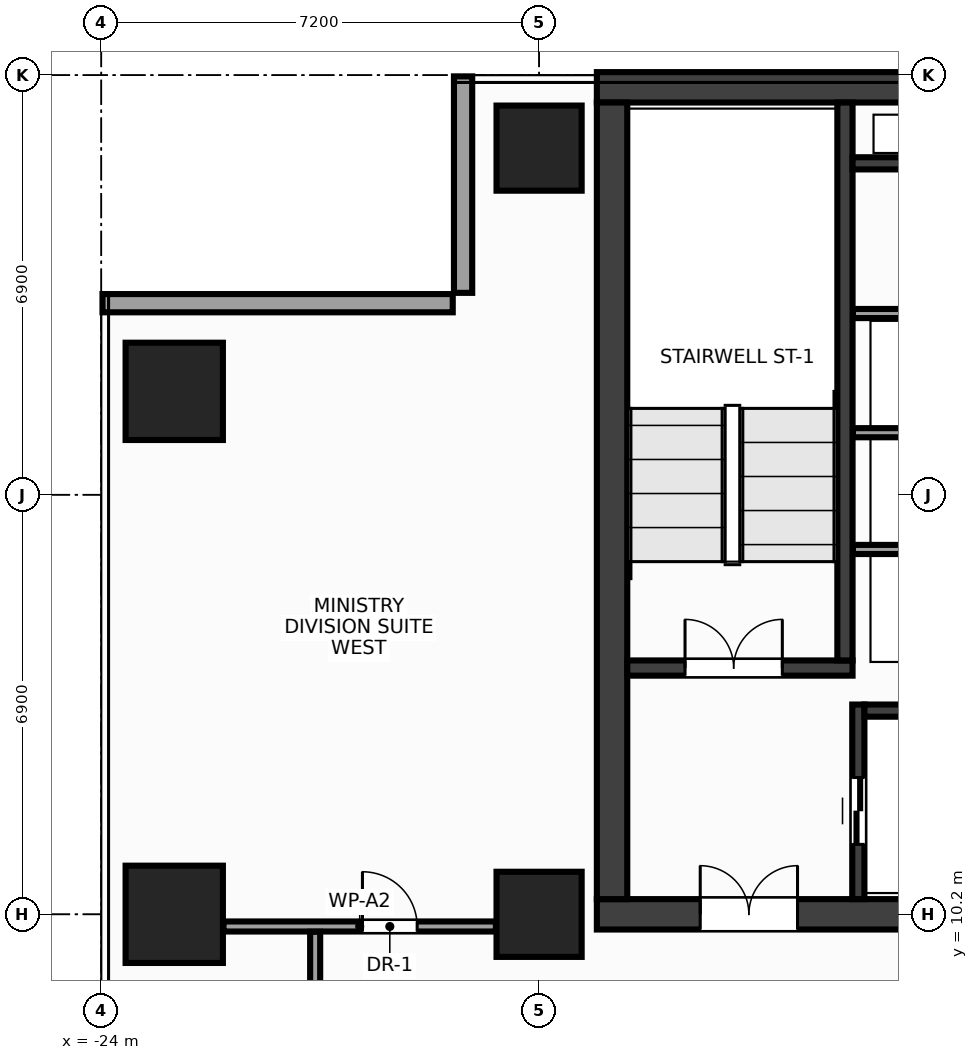
"""IFC4 building model, lengths in metres.
Left out: names, types, materials, properties, quantities, classifications, styles, units other than length and angle.
Written with IfcOpenShell. Run it as: python <this file> out.ifc"""

import sys

from ifc_helpers import new_model, si_unit, direction, frame, frame_2d, origin, origin_2d, place, context, subcontext, project, spatial, rectangle, extrude, source, transform, mapped, element, fill, save


model = new_model("IFC4")
c1 = context("Model", 3, precision=1e-05, world=origin(), true_north=direction((0.0, 1.0)))
c2 = subcontext(c1, "Body", "Model", "MODEL_VIEW")
j1 = project(units=[si_unit("LENGTHUNIT", "METRE"), si_unit("PLANEANGLEUNIT", "RADIAN")], contexts=[c1])
p1 = place(None, origin())
s1 = spatial("IfcSite", under=j1, at=p1, CompositionType="ELEMENT")
p2 = place(p1, origin())
s2 = spatial("IfcBuilding", under=s1, at=p2, CompositionType="ELEMENT")
p3 = place(p2, frame((0.0, 0.0, 218.0)))
s3 = spatial("IfcBuildingStorey", under=s2, at=p3, CompositionType="ELEMENT", Elevation=218.0)
m1 = source(origin(), c2, "Body", "SweptSolid", [
    extrude(rectangle(XDim=31.7, YDim=0.5, at=frame_2d((15.85, 0.0))), origin(), (0.0, 0.0, 1.0), 3.6),
])
p4 = place(p3, frame((-15.85, 23.8, 0.0), z_axis=(0.0, 0.0, 1.0), x_axis=(1.0, 0.0, 0.0)))
e1 = element("IfcWall", 1, at=p4, inside=s3, PredefinedType="SHEAR", context=c2, shape_type="MappedRepresentation", body=[
    mapped(m1, transform((0.0, 0.0, 0.0), x_axis=(1.0, 0.0, 0.0), y_axis=(0.0, 1.0, 0.0), z_axis=(0.0, 0.0, 1.0), scale=1.0)),
])
p5 = place(p3, frame((-15.85, 10.2, 0.0), z_axis=(0.0, 0.0, 1.0), x_axis=(1.0, 0.0, 0.0)))
e2 = element("IfcWall", 2, at=p5, inside=s3, PredefinedType="SHEAR", context=c2, shape_type="MappedRepresentation", body=[
    mapped(m1, transform((0.0, 0.0, 0.0), x_axis=(1.0, 0.0, 0.0), y_axis=(0.0, 1.0, 0.0), z_axis=(0.0, 0.0, 1.0), scale=1.0)),
])
p6 = place(p5, frame((1.7, 0.0, 0.0)))
e3 = element("IfcOpeningElement", 3, at=p6, cuts=e2, PredefinedType="OPENING", context=c2, shape_type="SweptSolid", body=[
    extrude(rectangle(XDim=1.6, YDim=2.15, at=frame_2d((0.8, 1.075))), frame((0.0, 0.262, 0.0), z_axis=(0.0, -1.0, 0.0), x_axis=(1.0, 0.0, 0.0)), (0.0, 0.0, 1.0), 0.524),
])
p7 = place(p5, frame((28.4, 0.0, 0.0)))
e4 = element("IfcOpeningElement", 4, at=p7, cuts=e2, PredefinedType="OPENING", context=c2, shape_type="SweptSolid", body=[
    extrude(rectangle(XDim=1.6, YDim=2.15, at=frame_2d((0.8, 1.075))), frame((0.0, 0.262, 0.0), z_axis=(0.0, -1.0, 0.0), x_axis=(1.0, 0.0, 0.0)), (0.0, 0.0, 1.0), 0.524),
])
p8 = place(p5, frame((15.1, 0.0, 0.0)))
e5 = element("IfcOpeningElement", 5, at=p8, cuts=e2, PredefinedType="OPENING", context=c2, shape_type="SweptSolid", body=[
    extrude(rectangle(XDim=1.5, YDim=2.2, at=frame_2d((0.75, 1.1))), frame((0.0, 0.262, 0.0), z_axis=(0.0, -1.0, 0.0), x_axis=(1.0, 0.0, 0.0)), (0.0, 0.0, 1.0), 0.524),
])
m2 = source(origin(), c2, "Body", "SweptSolid", [
    extrude(rectangle(XDim=13.1, YDim=0.5, at=frame_2d((6.55, 0.0))), origin(), (0.0, 0.0, 1.0), 3.6),
])
p9 = place(p3, frame((-15.6, 10.45, 0.0), z_axis=(0.0, 0.0, 1.0), x_axis=(0.0, 1.0, 0.0)))
e6 = element("IfcWall", 6, at=p9, inside=s3, PredefinedType="SHEAR", context=c2, shape_type="MappedRepresentation", body=[
    mapped(m2, transform((0.0, 0.0, 0.0), x_axis=(1.0, 0.0, 0.0), y_axis=(0.0, 1.0, 0.0), z_axis=(0.0, 0.0, 1.0), scale=1.0)),
])
m3 = source(origin(), c2, "Body", "SweptSolid", [
    extrude(rectangle(XDim=3.705, YDim=0.25, at=frame_2d((1.853, 0.0))), origin(), (0.0, 0.0, 1.0), 3.6),
])
p10 = place(p3, frame((-15.35, 14.25, 0.0), z_axis=(0.0, 0.0, 1.0), x_axis=(1.0, 0.0, 0.0)))
e7 = element("IfcWall", 7, at=p10, inside=s3, PredefinedType="SHEAR", context=c2, shape_type="MappedRepresentation", body=[
    mapped(m3, transform((0.0, 0.0, 0.0), x_axis=(1.0, 0.0, 0.0), y_axis=(0.0, 1.0, 0.0), z_axis=(0.0, 0.0, 1.0), scale=1.0)),
])
p11 = place(p10, frame((0.95, 0.0, 0.0)))
e8 = element("IfcOpeningElement", 8, at=p11, cuts=e7, PredefinedType="OPENING", context=c2, shape_type="SweptSolid", body=[
    extrude(rectangle(XDim=1.6, YDim=2.15, at=frame_2d((0.8, 1.075))), frame((0.0, 0.137, 0.0), z_axis=(0.0, -1.0, 0.0), x_axis=(1.0, 0.0, 0.0)), (0.0, 0.0, 1.0), 0.274),
])
m4 = source(origin(), c2, "Body", "SweptSolid", [
    extrude(rectangle(XDim=9.175, YDim=0.25, at=frame_2d((4.587, 0.0))), origin(), (0.0, 0.0, 1.0), 3.6),
])
p12 = place(p3, frame((-11.77, 14.375, 0.0), z_axis=(0.0, 0.0, 1.0), x_axis=(0.0, 1.0, 0.0)))
e9 = element("IfcWall", 9, at=p12, inside=s3, PredefinedType="SHEAR", context=c2, shape_type="MappedRepresentation", body=[
    mapped(m4, transform((0.0, 0.0, 0.0), x_axis=(1.0, 0.0, 0.0), y_axis=(0.0, 1.0, 0.0), z_axis=(0.0, 0.0, 1.0), scale=1.0)),
])
m5 = source(origin(), c2, "Body", "SweptSolid", [
    extrude(rectangle(XDim=3.2, YDim=0.2, at=frame_2d((1.6, 0.0))), origin(), (0.0, 0.0, 1.0), 3.6),
])
p13 = place(p3, frame((-11.55, 10.45, 0.0), z_axis=(0.0, 0.0, 1.0), x_axis=(0.0, 1.0, 0.0)))
e10 = element("IfcWall", 10, at=p13, inside=s3, PredefinedType="SHEAR", context=c2, shape_type="MappedRepresentation", body=[
    mapped(m5, transform((0.0, 0.0, 0.0), x_axis=(1.0, 0.0, 0.0), y_axis=(0.0, 1.0, 0.0), z_axis=(0.0, 0.0, 1.0), scale=1.0)),
])
p14 = place(p13, frame((0.9, 0.0, 0.0)))
e11 = element("IfcOpeningElement", 11, at=p14, cuts=e10, PredefinedType="OPENING", context=c2, shape_type="SweptSolid", body=[
    extrude(rectangle(XDim=1.1, YDim=2.15, at=frame_2d((0.55, 1.075))), frame((0.0, 0.112, 0.0), z_axis=(0.0, -1.0, 0.0), x_axis=(1.0, 0.0, 0.0)), (0.0, 0.0, 1.0), 0.224),
])
m6 = source(origin(), c2, "Body", "SweptSolid", [
    extrude(rectangle(XDim=2.825, YDim=0.2, at=frame_2d((1.413, 0.0))), origin(), (0.0, 0.0, 1.0), 3.6),
])
p15 = place(p3, frame((-11.45, 13.55, 0.0), z_axis=(0.0, 0.0, 1.0), x_axis=(1.0, 0.0, 0.0)))
e12 = element("IfcWall", 12, at=p15, inside=s3, PredefinedType="SHEAR", context=c2, shape_type="MappedRepresentation", body=[
    mapped(m6, transform((0.0, 0.0, 0.0), x_axis=(1.0, 0.0, 0.0), y_axis=(0.0, 1.0, 0.0), z_axis=(0.0, 0.0, 1.0), scale=1.0)),
])
m7 = source(origin(), c2, "Body", "SweptSolid", [
    extrude(rectangle(XDim=3.02, YDim=0.2, at=frame_2d((1.51, 0.0))), origin(), (0.0, 0.0, 1.0), 3.6),
])
p16 = place(p3, frame((-11.645, 22.55, 0.0), z_axis=(0.0, 0.0, 1.0), x_axis=(1.0, 0.0, 0.0)))
e13 = element("IfcWall", 13, at=p16, inside=s3, PredefinedType="SHEAR", context=c2, shape_type="MappedRepresentation", body=[
    mapped(m7, transform((0.0, 0.0, 0.0), x_axis=(1.0, 0.0, 0.0), y_axis=(0.0, 1.0, 0.0), z_axis=(0.0, 0.0, 1.0), scale=1.0)),
])
m8 = source(origin(), c2, "Body", "SweptSolid", [
    extrude(rectangle(XDim=1.4, YDim=1.4, at=origin_2d()), origin(), (0.0, 0.0, 1.0), 3.6),
])
for number, where, z_axis, x_axis in (
    (14, (-16.8, 10.2, 0.0), (0.0, 0.0, 1.0), (1.0, 0.0, 0.0)),
    (15, (-16.8, 22.8, 0.0), (0.0, 0.0, 1.0), (1.0, 0.0, 0.0)),
):
    element("IfcColumn", number, at=place(p3, frame(where, z_axis=z_axis, x_axis=x_axis)), inside=s3, PredefinedType="COLUMN", context=c2, shape_type="MappedRepresentation", body=[
        mapped(m8, transform((0.0, 0.0, 0.0), x_axis=(1.0, 0.0, 0.0), y_axis=(0.0, 1.0, 0.0), z_axis=(0.0, 0.0, 1.0), scale=1.0)),
    ])
m9 = source(origin(), c2, "Body", "SweptSolid", [
    extrude(rectangle(XDim=1.6, YDim=1.6, at=origin_2d()), origin(), (0.0, 0.0, 1.0), 3.6),
])
for number, where, z_axis, x_axis in (
    (16, (-22.8, 10.2, 0.0), (0.0, 0.0, 1.0), (1.0, 0.0, 0.0)),
    (17, (-22.8, 18.8, 0.0), (0.0, 0.0, 1.0), (1.0, 0.0, 0.0)),
):
    element("IfcColumn", number, at=place(p3, frame(where, z_axis=z_axis, x_axis=x_axis)), inside=s3, PredefinedType="COLUMN", context=c2, shape_type="MappedRepresentation", body=[
        mapped(m9, transform((0.0, 0.0, 0.0), x_axis=(1.0, 0.0, 0.0), y_axis=(0.0, 1.0, 0.0), z_axis=(0.0, 0.0, 1.0), scale=1.0)),
    ])
m10 = source(origin(), c2, "Body", "SweptSolid", [
    extrude(rectangle(XDim=3.56, YDim=0.3, at=frame_2d((1.78, 0.0))), origin(), (0.0, 0.0, 1.0), 2.76),
])
p17 = place(p3, frame((-18.05, 23.98, 0.0), z_axis=(0.0, 0.0, 1.0), x_axis=(0.0, -1.0, 0.0)))
e18 = element("IfcWall", 18, at=p17, inside=s3, PredefinedType="STANDARD", context=c2, shape_type="MappedRepresentation", body=[
    mapped(m10, transform((0.0, 0.0, 0.0), x_axis=(1.0, 0.0, 0.0), y_axis=(0.0, 1.0, 0.0), z_axis=(0.0, 0.0, 1.0), scale=1.0)),
])
m11 = source(origin(), c2, "Body", "SweptSolid", [
    extrude(rectangle(XDim=5.76, YDim=0.3, at=frame_2d((2.88, 0.0))), origin(), (0.0, 0.0, 1.0), 2.76),
])
p18 = place(p3, frame((-18.22, 20.25, 0.0), z_axis=(0.0, 0.0, 1.0), x_axis=(-1.0, 0.0, 0.0)))
e19 = element("IfcWall", 19, at=p18, inside=s3, PredefinedType="STANDARD", context=c2, shape_type="MappedRepresentation", body=[
    mapped(m11, transform((0.0, 0.0, 0.0), x_axis=(1.0, 0.0, 0.0), y_axis=(0.0, 1.0, 0.0), z_axis=(0.0, 0.0, 1.0), scale=1.0)),
])
m12 = source(origin(), c2, "Body", "SweptSolid", [
    extrude(rectangle(XDim=3.01, YDim=0.15, at=frame_2d((1.505, 0.0))), origin(), (0.0, 0.0, 1.0), 3.38),
])
for number, where, z_axis, x_axis in (
    (20, (-11.64, 16.2, 0.0), (0.0, 0.0, 1.0), (1.0, 0.0, 0.0)),
    (21, (-11.64, 18.12, 0.0), (0.0, 0.0, 1.0), (1.0, 0.0, 0.0)),
    (22, (-11.64, 20.08, 0.0), (0.0, 0.0, 1.0), (1.0, 0.0, 0.0)),
):
    element("IfcWall", number, at=place(p3, frame(where, z_axis=z_axis, x_axis=x_axis)), inside=s3, PredefinedType="PARTITIONING", context=c2, shape_type="MappedRepresentation", body=[
        mapped(m12, transform((0.0, 0.0, 0.0), x_axis=(1.0, 0.0, 0.0), y_axis=(0.0, 1.0, 0.0), z_axis=(0.0, 0.0, 1.0), scale=1.0)),
    ])
m13 = source(origin(), c2, "Body", "SweptSolid", [
    extrude(rectangle(XDim=4.48, YDim=0.165, at=frame_2d((2.24, 0.0))), origin(), (0.0, 0.0, 1.0), 2.915),
])
p19 = place(p3, frame((-21.99, 10.0, 0.0), z_axis=(0.0, 0.0, 1.0), x_axis=(1.0, 0.0, 0.0)))
e23 = element("IfcWall", 23, at=p19, inside=s3, PredefinedType="PARTITIONING", context=c2, shape_type="MappedRepresentation", body=[
    mapped(m13, transform((0.0, 0.0, 0.0), x_axis=(1.0, 0.0, 0.0), y_axis=(0.0, 1.0, 0.0), z_axis=(0.0, 0.0, 1.0), scale=1.0)),
])
p20 = place(p19, frame((2.285, 0.0, 0.0)))
e24 = element("IfcOpeningElement", 24, at=p20, cuts=e23, PredefinedType="OPENING", context=c2, shape_type="SweptSolid", body=[
    extrude(rectangle(XDim=0.9, YDim=2.15, at=frame_2d((0.45, 1.075))), frame((0.0, 0.094, 0.0), z_axis=(0.0, -1.0, 0.0), x_axis=(1.0, 0.0, 0.0)), (0.0, 0.0, 1.0), 0.189),
])
m14 = source(origin(), c2, "Body", "SweptSolid", [
    extrude(rectangle(XDim=2.358, YDim=0.165, at=frame_2d((1.179, 0.0))), origin(), (0.0, 0.0, 1.0), 3.38),
])
p21 = place(p3, frame((-20.482, 7.555, 0.0), z_axis=(0.0, 0.0, 1.0), x_axis=(0.0, 1.0, 0.0)))
e25 = element("IfcWall", 25, at=p21, inside=s3, PredefinedType="PARTITIONING", context=c2, shape_type="MappedRepresentation", body=[
    mapped(m14, transform((0.0, 0.0, 0.0), x_axis=(1.0, 0.0, 0.0), y_axis=(0.0, 1.0, 0.0), z_axis=(0.0, 0.0, 1.0), scale=1.0)),
])
m15 = source(origin(), c2, "Body", "SweptSolid", [
    extrude(rectangle(XDim=1.6, YDim=2.15, at=frame_2d((0.8, 1.075))), frame((0.0, 0.025, 0.0), z_axis=(0.0, -1.0, 0.0), x_axis=(1.0, 0.0, 0.0)), (0.0, 0.0, 1.0), 0.05),
])
p22 = place(p11, origin())
e26 = element("IfcDoor", 26, at=p22, inside=s3, OperationType="DOUBLE_DOOR_SINGLE_SWING", PredefinedType="DOOR", context=c2, shape_type="MappedRepresentation", body=[
    mapped(m15, transform((0.0, 0.0, 0.0), x_axis=(1.0, 0.0, 0.0), y_axis=(0.0, 1.0, 0.0), z_axis=(0.0, 0.0, 1.0), scale=1.0)),
])
fill(e8, e26)
p23 = place(p6, origin())
e27 = element("IfcDoor", 27, at=p23, inside=s3, OperationType="DOUBLE_DOOR_SINGLE_SWING", PredefinedType="DOOR", context=c2, shape_type="MappedRepresentation", body=[
    mapped(m15, transform((0.0, 0.0, 0.0), x_axis=(1.0, 0.0, 0.0), y_axis=(0.0, 1.0, 0.0), z_axis=(0.0, 0.0, 1.0), scale=1.0)),
])
fill(e3, e27)
m16 = source(origin(), c2, "Body", "SweptSolid", [
    extrude(rectangle(XDim=1.1, YDim=2.15, at=frame_2d((0.55, 1.075))), frame((0.0, 0.025, 0.0), z_axis=(0.0, -1.0, 0.0), x_axis=(1.0, 0.0, 0.0)), (0.0, 0.0, 1.0), 0.05),
])
p24 = place(p14, origin())
e28 = element("IfcDoor", 28, at=p24, inside=s3, OperationType="DOUBLE_DOOR_SLIDING", PredefinedType="DOOR", context=c2, shape_type="MappedRepresentation", body=[
    mapped(m16, transform((0.0, 0.0, 0.0), x_axis=(1.0, 0.0, 0.0), y_axis=(0.0, 1.0, 0.0), z_axis=(0.0, 0.0, 1.0), scale=1.0)),
])
fill(e11, e28)
m17 = source(origin(), c2, "Body", "SweptSolid", [
    extrude(rectangle(XDim=0.9, YDim=2.15, at=frame_2d((0.45, 1.075))), frame((0.0, 0.025, 0.0), z_axis=(0.0, -1.0, 0.0), x_axis=(1.0, 0.0, 0.0)), (0.0, 0.0, 1.0), 0.05),
])
p25 = place(p20, origin())
e29 = element("IfcDoor", 29, at=p25, inside=s3, OperationType="SINGLE_SWING_LEFT", PredefinedType="DOOR", context=c2, shape_type="MappedRepresentation", body=[
    mapped(m17, transform((0.0, 0.0, 0.0), x_axis=(1.0, 0.0, 0.0), y_axis=(0.0, 1.0, 0.0), z_axis=(0.0, 0.0, 1.0), scale=1.0)),
])
fill(e24, e29)
save(model, sys.argv[1])
